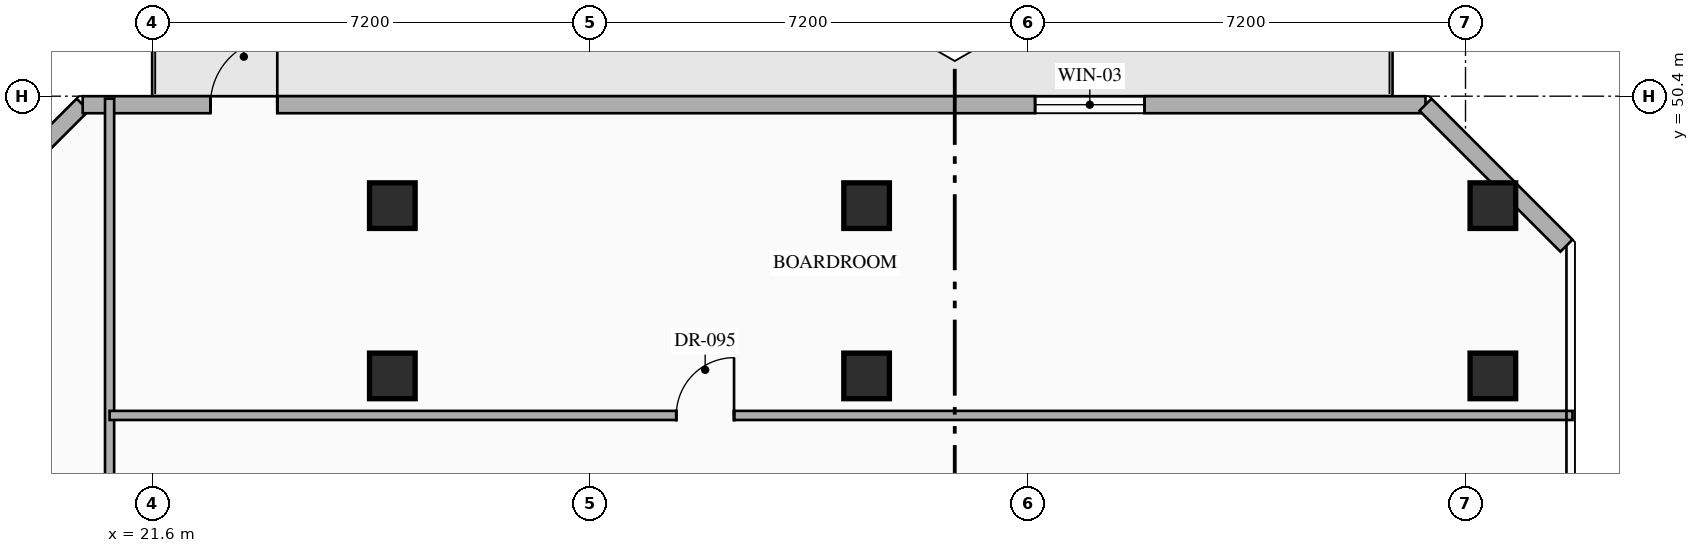
"""IFC4 building model, lengths in metres.
Left out: names, types, materials, properties, quantities, classifications, styles, units other than length and angle.
Written with IfcOpenShell. Run it as: python <this file> out.ifc"""

import sys

from ifc_helpers import new_model, si_unit, direction, frame, frame_2d, origin, origin_2d, place, context, subcontext, project, spatial, rectangle, hollow_rectangle, extrude, element, fill, save


model = new_model("IFC4")
c1 = context("Model", 3, precision=1e-05, world=origin(), true_north=direction((0.0, 1.0)))
c2 = subcontext(c1, "Body", "Model", "MODEL_VIEW")
j1 = project(units=[si_unit("LENGTHUNIT", "METRE"), si_unit("PLANEANGLEUNIT", "RADIAN")], contexts=[c1])
p1 = place(None, origin())
s1 = spatial("IfcSite", under=j1, at=p1, CompositionType="ELEMENT")
p2 = place(p1, origin())
s2 = spatial("IfcBuilding", under=s1, at=p2, CompositionType="ELEMENT")
p3 = place(p2, frame((0.0, 0.0, 191.55)))
s3 = spatial("IfcBuildingStorey", under=s2, at=p3, CompositionType="ELEMENT", Elevation=191.55)
for number, where, z_axis, x_axis in (
    (1, (25.55, 45.8, 0.0), (0.0, 0.0, 1.0), (1.0, 0.0, 0.0)),
    (2, (33.35, 45.8, 0.0), (0.0, 0.0, 1.0), (1.0, 0.0, 0.0)),
    (3, (43.65, 45.8, 0.0), (0.0, 0.0, 1.0), (1.0, 0.0, 0.0)),
    (4, (25.55, 48.6, 0.0), (0.0, 0.0, 1.0), (1.0, 0.0, 0.0)),
    (5, (33.35, 48.6, 0.0), (0.0, 0.0, 1.0), (1.0, 0.0, 0.0)),
    (6, (43.65, 48.6, 0.0), (0.0, 0.0, 1.0), (1.0, 0.0, 0.0)),
):
    element("IfcColumn", number, at=place(p3, frame(where, z_axis=z_axis, x_axis=x_axis)), inside=s3, PredefinedType="COLUMN", context=c2, shape_type="SweptSolid", body=[
        extrude(hollow_rectangle(XDim=0.75, YDim=0.75, WallThickness=0.028, at=origin_2d()), origin(), (0.0, 0.0, 1.0), 3.6),
    ])
p4 = place(p3, frame((18.14, 47.942, 0.0), z_axis=(0.0, 0.0, 1.0), x_axis=(0.707106781187, 0.707106781187, 0.0)))
e7 = element("IfcWall", 7, at=p4, inside=s3, PredefinedType="STANDARD", context=c2, shape_type="SweptSolid", body=[
    extrude(rectangle(XDim=3.278, YDim=0.28, at=frame_2d((1.639, 0.0))), origin(), (0.0, 0.0, 1.0), 3.35),
])
p5 = place(p3, frame((20.458, 50.26, 0.0), z_axis=(0.0, 0.0, 1.0), x_axis=(1.0, 0.0, 0.0)))
e8 = element("IfcWall", 8, at=p5, inside=s3, PredefinedType="STANDARD", context=c2, shape_type="SweptSolid", body=[
    extrude(rectangle(XDim=22.084, YDim=0.28, at=frame_2d((11.042, 0.0))), origin(), (0.0, 0.0, 1.0), 3.35),
])
p6 = place(p5, frame((2.1, 0.0, 0.0)))
e9 = element("IfcOpeningElement", 9, at=p6, cuts=e8, PredefinedType="OPENING", context=c2, shape_type="SweptSolid", body=[
    extrude(rectangle(XDim=1.1, YDim=2.2, at=frame_2d((0.55, 1.1))), frame((0.0, 0.15, 0.0), z_axis=(0.0, -1.0, 0.0), x_axis=(1.0, 0.0, 0.0)), (0.0, 0.0, 1.0), 0.3),
])
p7 = place(p5, frame((15.663, 0.0, 0.85)))
e10 = element("IfcOpeningElement", 10, at=p7, cuts=e8, PredefinedType="OPENING", context=c2, shape_type="SweptSolid", body=[
    extrude(rectangle(XDim=1.8, YDim=2.1, at=frame_2d((0.9, 1.05))), frame((0.0, 0.15, 0.0), z_axis=(0.0, -1.0, 0.0), x_axis=(1.0, 0.0, 0.0)), (0.0, 0.0, 1.0), 0.3),
])
p8 = place(p3, frame((42.542, 50.26, 0.0), z_axis=(0.0, 0.0, 1.0), x_axis=(0.707106781187, -0.707106781187, 0.0)))
e11 = element("IfcWall", 11, at=p8, inside=s3, PredefinedType="STANDARD", context=c2, shape_type="SweptSolid", body=[
    extrude(rectangle(XDim=3.278, YDim=0.28, at=frame_2d((1.639, 0.0))), origin(), (0.0, 0.0, 1.0), 3.35),
])
p9 = place(p3, frame((20.9, 23.44, 0.0), z_axis=(0.0, 0.0, 1.0), x_axis=(0.0, 1.0, 0.0)))
e12 = element("IfcWall", 12, at=p9, inside=s3, PredefinedType="PARTITIONING", context=c2, shape_type="SweptSolid", body=[
    extrude(rectangle(XDim=26.92, YDim=0.15, at=frame_2d((13.46, 0.0))), origin(), (0.0, 0.0, 1.0), 3.35),
])
p10 = place(p9, frame((7.943, 0.0, 0.0)))
e13 = element("IfcOpeningElement", 13, at=p10, cuts=e12, PredefinedType="OPENING", context=c2, shape_type="SweptSolid", body=[
    extrude(rectangle(XDim=0.95, YDim=2.15, at=frame_2d((0.475, 1.075))), frame((0.0, 0.085, 0.0), z_axis=(0.0, -1.0, 0.0), x_axis=(1.0, 0.0, 0.0)), (0.0, 0.0, 1.0), 0.17),
])
p11 = place(p3, frame((20.9, 45.15, 0.0), z_axis=(0.0, 0.0, 1.0), x_axis=(1.0, 0.0, 0.0)))
e14 = element("IfcWall", 14, at=p11, inside=s3, PredefinedType="PARTITIONING", context=c2, shape_type="SweptSolid", body=[
    extrude(rectangle(XDim=24.06, YDim=0.15, at=frame_2d((12.03, 0.0))), origin(), (0.0, 0.0, 1.0), 3.35),
])
p12 = place(p11, frame((9.32, 0.0, 0.0)))
e15 = element("IfcOpeningElement", 15, at=p12, cuts=e14, PredefinedType="OPENING", context=c2, shape_type="SweptSolid", body=[
    extrude(rectangle(XDim=0.95, YDim=2.15, at=frame_2d((0.475, 1.075))), frame((0.0, 0.085, 0.0), z_axis=(0.0, -1.0, 0.0), x_axis=(1.0, 0.0, 0.0)), (0.0, 0.0, 1.0), 0.17),
])
p13 = place(p6, origin())
e16 = element("IfcDoor", 16, at=p13, inside=s3, OperationType="SINGLE_SWING_RIGHT", PredefinedType="DOOR", context=c2, shape_type="SweptSolid", body=[
    extrude(rectangle(XDim=1.1, YDim=2.2, at=frame_2d((0.55, 1.1))), frame((0.0, 0.025, 0.0), z_axis=(0.0, -1.0, 0.0), x_axis=(1.0, 0.0, 0.0)), (0.0, 0.0, 1.0), 0.05),
])
fill(e9, e16)
p14 = place(p7, origin())
e17 = element("IfcWindow", 17, at=p14, inside=s3, PartitioningType="SINGLE_PANEL", PredefinedType="WINDOW", context=c2, shape_type="SweptSolid", body=[
    extrude(rectangle(XDim=1.8, YDim=2.1, at=frame_2d((0.9, 1.05))), frame((0.0, 0.03, 0.0), z_axis=(0.0, -1.0, 0.0), x_axis=(1.0, 0.0, 0.0)), (0.0, 0.0, 1.0), 0.06),
])
fill(e10, e17)
p15 = place(p12, origin())
e18 = element("IfcDoor", 18, at=p15, inside=s3, OperationType="SINGLE_SWING_RIGHT", PredefinedType="DOOR", context=c2, shape_type="SweptSolid", body=[
    extrude(rectangle(XDim=0.95, YDim=2.15, at=frame_2d((0.475, 1.075))), frame((0.0, 0.025, 0.0), z_axis=(0.0, -1.0, 0.0), x_axis=(1.0, 0.0, 0.0)), (0.0, 0.0, 1.0), 0.05),
])
fill(e15, e18)
save(model, sys.argv[1])
